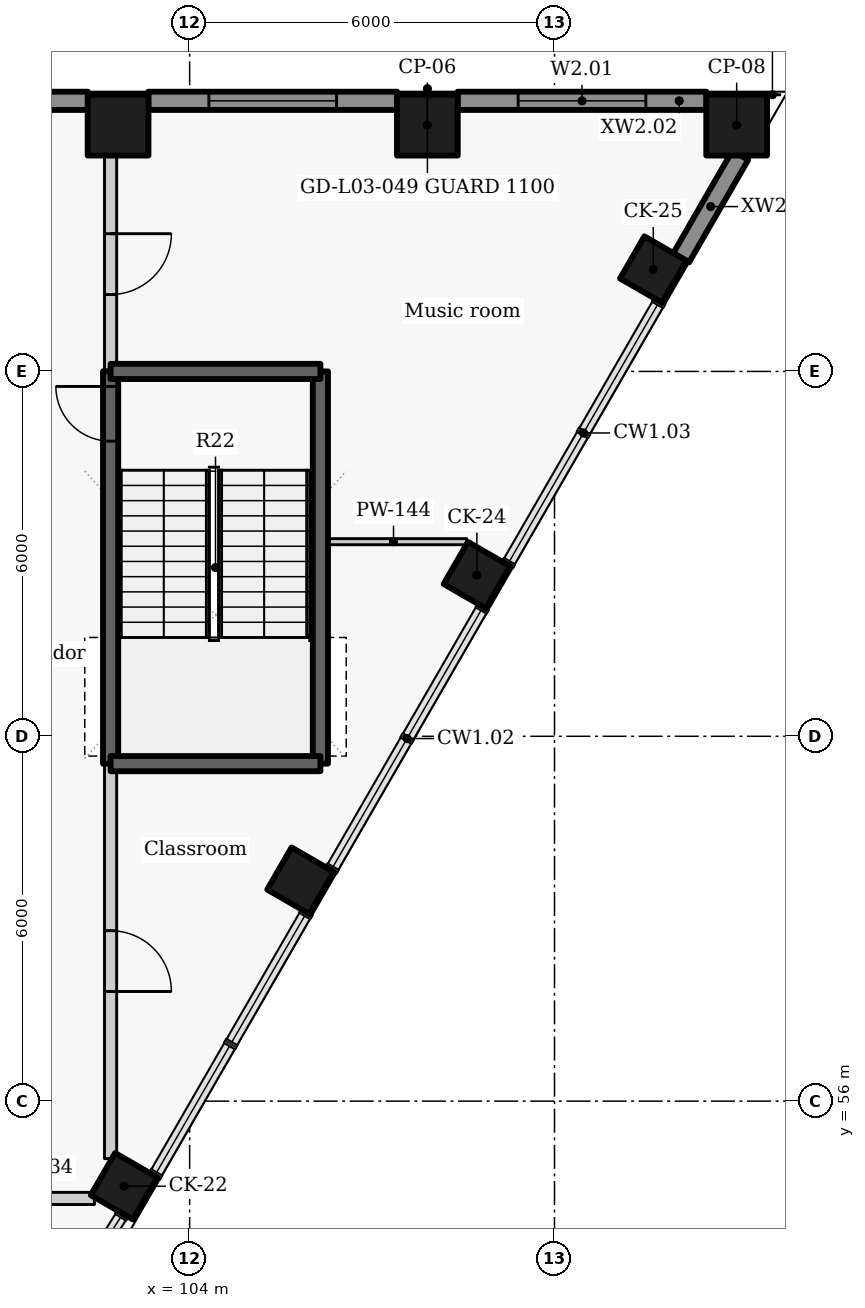
"""IFC4 building model, lengths in metres.
Left out: names, types, materials, properties, quantities, classifications, styles, units other than length and angle.
Written with IfcOpenShell. Run it as: python <this file> out.ifc"""

import sys

from ifc_helpers import new_model, si_unit, direction, frame, frame_2d, origin, origin_2d, place, context, subcontext, project, spatial, rectangle, extrude, element, fill, save


model = new_model("IFC4")
c1 = context("Model", 3, precision=1e-05, world=origin(), true_north=direction((0.0, 1.0)))
c2 = subcontext(c1, "Body", "Model", "MODEL_VIEW")
j1 = project(units=[si_unit("LENGTHUNIT", "METRE"), si_unit("PLANEANGLEUNIT", "RADIAN")], contexts=[c1])
p1 = place(None, origin())
s1 = spatial("IfcSite", under=j1, at=p1, CompositionType="ELEMENT")
p2 = place(p1, origin())
s2 = spatial("IfcBuilding", under=s1, at=p2, CompositionType="ELEMENT")
p3 = place(p2, frame((0.0, 0.0, 15.6)))
s3 = spatial("IfcBuildingStorey", under=s2, at=p3, CompositionType="ELEMENT", Elevation=15.6)
for number, where, z_axis, x_axis in (
    (1, (102.921, 54.6, 0.0), (0.0, 0.0, 1.0), (0.5, 0.866, 0.0)),
    (2, (105.822, 59.625, 0.0), (0.0, 0.0, 1.0), (0.5, 0.866, 0.0)),
    (3, (108.723, 64.65, 0.0), (0.0, 0.0, 1.0), (0.5, 0.866, 0.0)),
    (4, (111.625, 69.675, 0.0), (0.0, 0.0, 1.0), (0.5, 0.866, 0.0)),
):
    element("IfcColumn", number, at=place(p3, frame(where, z_axis=z_axis, x_axis=x_axis)), inside=s3, PredefinedType="COLUMN", context=c2, shape_type="SweptSolid", body=[
        extrude(rectangle(XDim=0.8, YDim=0.8, at=origin_2d()), origin(), (0.0, 0.0, 1.0), 4.2),
    ])
for number, where, z_axis, x_axis in (
    (5, (102.823, 72.05, 0.0), (0.0, 0.0, 1.0), (1.0, 0.0, 0.0)),
    (6, (107.909, 72.05, 0.0), (0.0, 0.0, 1.0), (1.0, 0.0, 0.0)),
    (7, (112.996, 72.05, 0.0), (0.0, 0.0, 1.0), (1.0, 0.0, 0.0)),
):
    element("IfcColumn", number, at=place(p3, frame(where, z_axis=z_axis, x_axis=x_axis)), inside=s3, PredefinedType="COLUMN", context=c2, shape_type="SweptSolid", body=[
        extrude(rectangle(XDim=1.0, YDim=1.0, at=origin_2d()), origin(), (0.0, 0.0, 1.0), 4.2),
    ])
p4 = place(p3, frame((112.082, 69.868, 0.0), z_axis=(0.0, 0.0, 1.0), x_axis=(0.500051850797, 0.865995465643, 0.0)))
e8 = element("IfcWall", 8, at=p4, inside=s3, PredefinedType="SOLIDWALL", context=c2, shape_type="SweptSolid", body=[
    extrude(rectangle(XDim=1.946, YDim=0.3, at=frame_2d((0.973, 0.0))), origin(), (0.0, 0.0, 1.0), 3.0),
])
p5 = place(p3, frame((112.5, 72.45, 0.0), z_axis=(0.0, 0.0, 1.0), x_axis=(-1.0, 0.0, 0.0)))
e9 = element("IfcWall", 9, at=p5, inside=s3, PredefinedType="SOLIDWALL", context=c2, shape_type="SweptSolid", body=[
    extrude(rectangle(XDim=4.095, YDim=0.3, at=frame_2d((2.047, 0.0))), origin(), (0.0, 0.0, 1.0), 3.0),
])
p6 = place(p5, frame((0.998, 0.0, 0.9)))
e10 = element("IfcOpeningElement", 10, at=p6, cuts=e9, PredefinedType="OPENING", context=c2, shape_type="SweptSolid", body=[
    extrude(rectangle(XDim=2.1, YDim=2.05, at=frame_2d((1.05, 1.025))), frame((0.0, 0.16, 0.0), z_axis=(0.0, -1.0, 0.0), x_axis=(1.0, 0.0, 0.0)), (0.0, 0.0, 1.0), 0.32),
])
p7 = place(p3, frame((107.413, 72.45, 0.0), z_axis=(0.0, 0.0, 1.0), x_axis=(-1.0, 0.0, 0.0)))
e11 = element("IfcWall", 11, at=p7, inside=s3, PredefinedType="SOLIDWALL", context=c2, shape_type="SweptSolid", body=[
    extrude(rectangle(XDim=4.094, YDim=0.3, at=frame_2d((2.047, 0.0))), origin(), (0.0, 0.0, 1.0), 3.0),
])
p8 = place(p7, frame((0.997, 0.0, 0.9)))
e12 = element("IfcOpeningElement", 12, at=p8, cuts=e11, PredefinedType="OPENING", context=c2, shape_type="SweptSolid", body=[
    extrude(rectangle(XDim=2.1, YDim=2.05, at=frame_2d((1.05, 1.025))), frame((0.0, 0.16, 0.0), z_axis=(0.0, -1.0, 0.0), x_axis=(1.0, 0.0, 0.0)), (0.0, 0.0, 1.0), 0.32),
])
p9 = place(p3, frame((102.327, 72.45, 0.0), z_axis=(0.0, 0.0, 1.0), x_axis=(-1.0, 0.0, 0.0)))
e13 = element("IfcWall", 13, at=p9, inside=s3, PredefinedType="SOLIDWALL", context=c2, shape_type="SweptSolid", body=[
    extrude(rectangle(XDim=3.973, YDim=0.3, at=frame_2d((1.986, 0.0))), origin(), (0.0, 0.0, 1.0), 3.0),
])
p10 = place(p9, frame((2.138, 0.0, 0.9)))
e14 = element("IfcOpeningElement", 14, at=p10, cuts=e13, PredefinedType="OPENING", context=c2, shape_type="SweptSolid", body=[
    extrude(rectangle(XDim=1.5, YDim=2.05, at=frame_2d((0.75, 1.025))), frame((0.0, 0.16, 0.0), z_axis=(0.0, -1.0, 0.0), x_axis=(1.0, 0.0, 0.0)), (0.0, 0.0, 1.0), 0.32),
])
p11 = place(p3, frame((102.7, 61.547, -0.3), z_axis=(0.0, 0.0, 1.0), x_axis=(0.0, 1.0, 0.0)))
e15 = element("IfcWall", 15, at=p11, inside=s3, PredefinedType="SHEAR", context=c2, shape_type="SweptSolid", body=[
    extrude(rectangle(XDim=6.456, YDim=0.25, at=frame_2d((3.228, 0.0))), origin(), (0.0, 0.0, 1.0), 4.2),
])
p12 = place(p11, frame((5.306, 0.0, 0.3)))
e16 = element("IfcOpeningElement", 16, at=p12, cuts=e15, PredefinedType="OPENING", context=c2, shape_type="SweptSolid", body=[
    extrude(rectangle(XDim=0.9, YDim=2.1, at=frame_2d((0.45, 1.05))), frame((0.0, 0.135, 0.0), z_axis=(0.0, -1.0, 0.0), x_axis=(1.0, 0.0, 0.0)), (0.0, 0.0, 1.0), 0.27),
])
p13 = place(p3, frame((102.7, 61.553, 0.0), z_axis=(0.0, 0.0, 1.0), x_axis=(0.0, -1.0, 0.0)))
e17 = element("IfcWall", 17, at=p13, inside=s3, PredefinedType="PARTITIONING", context=c2, shape_type="SweptSolid", body=[
    extrude(rectangle(XDim=6.499, YDim=0.2, at=frame_2d((3.249, 0.0))), origin(), (0.0, 0.0, 1.0), 3.9),
])
p14 = place(p13, frame((2.75, 0.0, 0.0)))
e18 = element("IfcOpeningElement", 18, at=p14, cuts=e17, PredefinedType="OPENING", context=c2, shape_type="SweptSolid", body=[
    extrude(rectangle(XDim=1.0, YDim=2.1, at=frame_2d((0.5, 1.05))), frame((0.0, 0.11, 0.0), z_axis=(0.0, -1.0, 0.0), x_axis=(1.0, 0.0, 0.0)), (0.0, 0.0, 1.0), 0.22),
])
p15 = place(p3, frame((102.7, 71.533, 0.0), z_axis=(0.0, 0.0, 1.0), x_axis=(0.0, -1.0, 0.0)))
e19 = element("IfcWall", 19, at=p15, inside=s3, PredefinedType="PARTITIONING", context=c2, shape_type="SweptSolid", body=[
    extrude(rectangle(XDim=3.536, YDim=0.2, at=frame_2d((1.768, 0.0))), origin(), (0.0, 0.0, 1.0), 3.9),
])
p16 = place(p15, frame((1.268, 0.0, 0.0)))
e20 = element("IfcOpeningElement", 20, at=p16, cuts=e19, PredefinedType="OPENING", context=c2, shape_type="SweptSolid", body=[
    extrude(rectangle(XDim=1.0, YDim=2.1, at=frame_2d((0.5, 1.05))), frame((0.0, 0.11, 0.0), z_axis=(0.0, -1.0, 0.0), x_axis=(1.0, 0.0, 0.0)), (0.0, 0.0, 1.0), 0.22),
])
p17 = place(p3, frame((106.15, 61.55, -0.3), z_axis=(0.0, 0.0, 1.0), x_axis=(0.0, 1.0, 0.0)))
e21 = element("IfcWall", 21, at=p17, inside=s3, PredefinedType="SHEAR", context=c2, shape_type="SweptSolid", body=[
    extrude(rectangle(XDim=6.45, YDim=0.25, at=frame_2d((3.225, 0.0))), origin(), (0.0, 0.0, 1.0), 4.2),
])
p18 = place(p3, frame((100.5, 54.4, 0.0), z_axis=(0.0, 0.0, 1.0), x_axis=(1.0, 0.0, 0.0)))
e22 = element("IfcWall", 22, at=p18, inside=s3, PredefinedType="PARTITIONING", context=c2, shape_type="SweptSolid", body=[
    extrude(rectangle(XDim=1.934, YDim=0.2, at=frame_2d((0.967, 0.0))), origin(), (0.0, 0.0, 1.0), 3.9),
])
for number, where, z_axis, x_axis in (
    (23, (102.7, 68.0, -0.3), (0.0, 0.0, 1.0), (1.0, 0.0, 0.0)),
    (24, (102.7, 61.55, -0.3), (0.0, 0.0, 1.0), (1.0, 0.0, 0.0)),
):
    element("IfcWall", number, at=place(p3, frame(where, z_axis=z_axis, x_axis=x_axis)), inside=s3, PredefinedType="SHEAR", context=c2, shape_type="SweptSolid", body=[
        extrude(rectangle(XDim=3.45, YDim=0.25, at=frame_2d((1.725, 0.0))), origin(), (0.0, 0.0, 1.0), 4.2),
    ])
p19 = place(p3, frame((106.15, 65.2, 0.0), z_axis=(0.0, 0.0, 1.0), x_axis=(1.0, 0.0, 0.0)))
e25 = element("IfcWall", 25, at=p19, inside=s3, PredefinedType="PARTITIONING", context=c2, shape_type="SweptSolid", body=[
    extrude(rectangle(XDim=2.406, YDim=0.1, at=frame_2d((1.203, 0.0))), origin(), (0.0, 0.0, 1.0), 3.9),
])
p20 = place(p6, origin())
e26 = element("IfcWindow", 26, at=p20, inside=s3, PartitioningType="SINGLE_PANEL", PredefinedType="WINDOW", context=c2, shape_type="SweptSolid", body=[
    extrude(rectangle(XDim=2.1, YDim=2.05, at=frame_2d((1.05, 1.025))), frame((0.0, 0.03, 0.0), z_axis=(0.0, -1.0, 0.0), x_axis=(1.0, 0.0, 0.0)), (0.0, 0.0, 1.0), 0.06),
])
fill(e10, e26)
p21 = place(p8, origin())
e27 = element("IfcWindow", 27, at=p21, inside=s3, PartitioningType="SINGLE_PANEL", PredefinedType="WINDOW", context=c2, shape_type="SweptSolid", body=[
    extrude(rectangle(XDim=2.1, YDim=2.05, at=frame_2d((1.05, 1.025))), frame((0.0, 0.03, 0.0), z_axis=(0.0, -1.0, 0.0), x_axis=(1.0, 0.0, 0.0)), (0.0, 0.0, 1.0), 0.06),
])
fill(e12, e27)
p22 = place(p12, origin())
e28 = element("IfcDoor", 28, at=p22, inside=s3, OperationType="SINGLE_SWING_RIGHT", PredefinedType="DOOR", context=c2, shape_type="SweptSolid", body=[
    extrude(rectangle(XDim=0.9, YDim=2.1, at=frame_2d((0.45, 1.05))), frame((0.0, 0.025, 0.0), z_axis=(0.0, -1.0, 0.0), x_axis=(1.0, 0.0, 0.0)), (0.0, 0.0, 1.0), 0.05),
])
fill(e16, e28)
p23 = place(p16, origin())
e29 = element("IfcDoor", 29, at=p23, inside=s3, OperationType="SINGLE_SWING_LEFT", PredefinedType="DOOR", context=c2, shape_type="SweptSolid", body=[
    extrude(rectangle(XDim=1.0, YDim=2.1, at=frame_2d((0.5, 1.05))), frame((0.0, 0.025, 0.0), z_axis=(0.0, -1.0, 0.0), x_axis=(1.0, 0.0, 0.0)), (0.0, 0.0, 1.0), 0.05),
])
fill(e20, e29)
p24 = place(p14, origin())
e30 = element("IfcDoor", 30, at=p24, inside=s3, OperationType="SINGLE_SWING_RIGHT", PredefinedType="DOOR", context=c2, shape_type="SweptSolid", body=[
    extrude(rectangle(XDim=1.0, YDim=2.1, at=frame_2d((0.5, 1.05))), frame((0.0, 0.025, 0.0), z_axis=(0.0, -1.0, 0.0), x_axis=(1.0, 0.0, 0.0)), (0.0, 0.0, 1.0), 0.05),
])
fill(e18, e30)
save(model, sys.argv[1])
